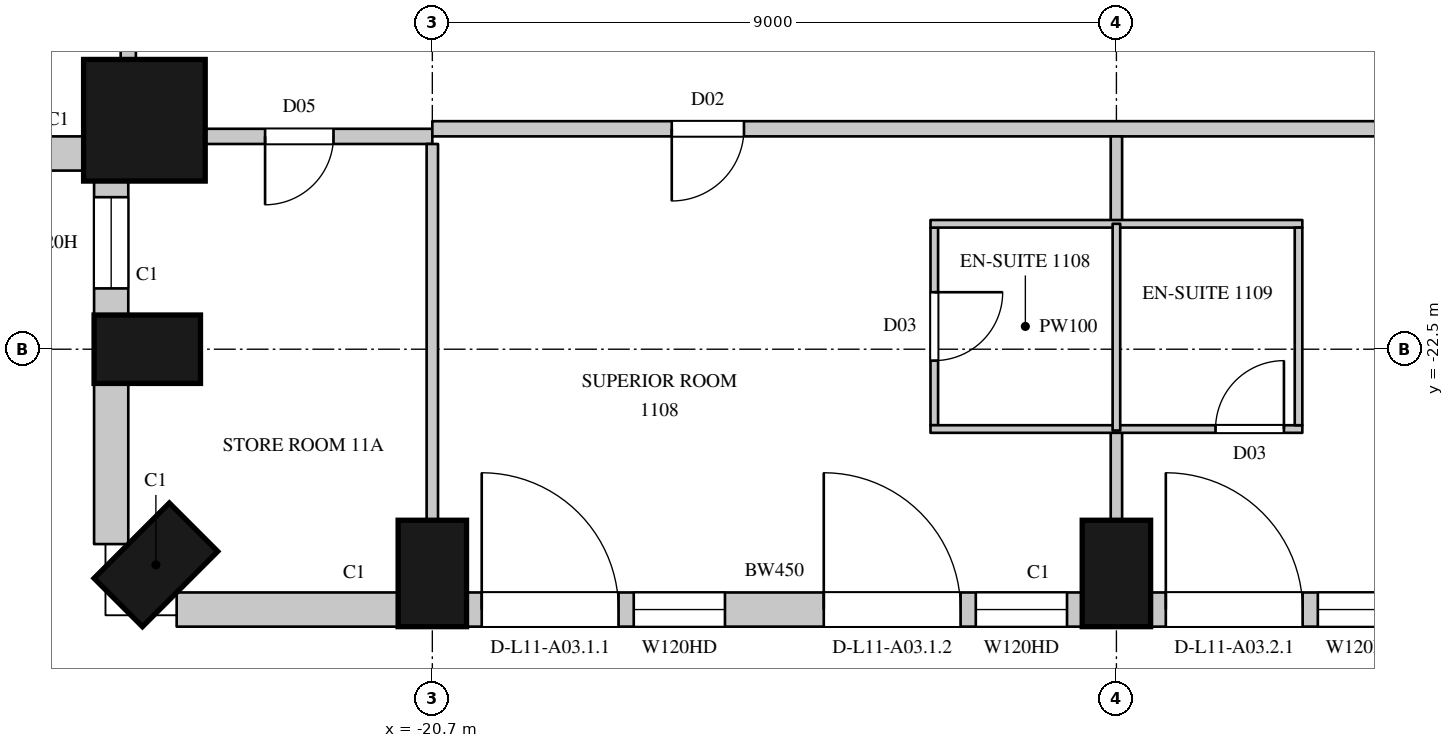
"""IFC4 building model, lengths in metres.
Left out: names, types, materials, properties, quantities, classifications, styles, units other than length and angle.
Written with IfcOpenShell. Run it as: python <this file> out.ifc"""

import sys

from ifc_helpers import new_model, si_unit, direction, frame, frame_2d, origin, origin_2d, place, context, subcontext, project, spatial, rectangle, circle, extrude, element, fill, save


model = new_model("IFC4")
c1 = context("Model", 3, precision=1e-05, world=origin(), true_north=direction((0.0, 1.0)))
c2 = subcontext(c1, "Body", "Model", "MODEL_VIEW")
j1 = project(units=[si_unit("LENGTHUNIT", "METRE"), si_unit("PLANEANGLEUNIT", "RADIAN")], contexts=[c1])
p1 = place(None, origin())
s1 = spatial("IfcSite", under=j1, at=p1, CompositionType="ELEMENT")
p2 = place(p1, origin())
s2 = spatial("IfcBuilding", under=s1, at=p2, CompositionType="ELEMENT")
p3 = place(p2, frame((0.0, 0.0, 69.9)))
s3 = spatial("IfcBuildingStorey", under=s2, at=p3, CompositionType="ELEMENT", Elevation=69.9)
p4 = place(p3, frame((-24.488, -19.488, 0.0), z_axis=(0.0, 0.0, 1.0), x_axis=(1.0, 0.0, 0.0)))
e1 = element("IfcColumn", 1, at=p4, inside=s3, PredefinedType="COLUMN", context=c2, shape_type="SweptSolid", body=[
    extrude(circle(Radius=0.8, at=origin_2d()), origin(), (0.0, 0.0, 1.0), 3.6),
])
for number, where, z_axis, x_axis in (
    (2, (-24.45, -22.5, 0.0), (0.0, 0.0, 1.0), (0.0, -1.0, 0.0)),
    (3, (-24.337, -25.337, 0.0), (0.0, 0.0, 1.0), (0.707, -0.707, 0.0)),
    (4, (-20.7, -25.45, 0.0), (0.0, 0.0, 1.0), (1.0, 0.0, 0.0)),
    (5, (-11.7, -25.45, 0.0), (0.0, 0.0, 1.0), (1.0, 0.0, 0.0)),
):
    element("IfcColumn", number, at=place(p3, frame(where, z_axis=z_axis, x_axis=x_axis)), inside=s3, PredefinedType="COLUMN", context=c2, shape_type="SweptSolid", body=[
        extrude(rectangle(XDim=0.9, YDim=1.4, at=origin_2d()), origin(), (0.0, 0.0, 1.0), 3.6),
    ])
p5 = place(p3, frame((-29.064, -19.925, 0.0), z_axis=(0.0, 0.0, 1.0), x_axis=(1.0, 0.0, 0.0)))
e6 = element("IfcWall", 6, at=p5, inside=s3, PredefinedType="SOLIDWALL", context=c2, shape_type="SweptSolid", body=[
    extrude(rectangle(XDim=3.805, YDim=0.45, at=frame_2d((1.903, 0.0))), origin(), (0.0, 0.0, 1.0), 3.3),
])
p6 = place(p5, frame((0.514, 0.0, 1.05)))
e7 = element("IfcOpeningElement", 7, at=p6, cuts=e6, PredefinedType="OPENING", context=c2, shape_type="SweptSolid", body=[
    extrude(rectangle(XDim=2.7, YDim=2.0, at=frame_2d((1.35, 1.0))), frame((0.0, 0.235, 0.0), z_axis=(0.0, -1.0, 0.0), x_axis=(1.0, 0.0, 0.0)), (0.0, 0.0, 1.0), 0.47),
])
p7 = place(p3, frame((-24.925, -20.259, 0.0), z_axis=(0.0, 0.0, 1.0), x_axis=(0.0, -1.0, 0.0)))
e8 = element("IfcWall", 8, at=p7, inside=s3, PredefinedType="SOLIDWALL", context=c2, shape_type="SweptSolid", body=[
    extrude(rectangle(XDim=1.792, YDim=0.45, at=frame_2d((0.896, 0.0))), origin(), (0.0, 0.0, 1.0), 3.3),
])
p8 = place(p7, frame((0.241, 0.0, 1.05)))
e9 = element("IfcOpeningElement", 9, at=p8, cuts=e8, PredefinedType="OPENING", context=c2, shape_type="SweptSolid", body=[
    extrude(rectangle(XDim=1.2, YDim=2.0, at=frame_2d((0.6, 1.0))), frame((0.0, 0.235, 0.0), z_axis=(0.0, -1.0, 0.0), x_axis=(1.0, 0.0, 0.0)), (0.0, 0.0, 1.0), 0.47),
])
p9 = place(p3, frame((-24.925, -22.95, 0.0), z_axis=(0.0, 0.0, 1.0), x_axis=(0.0, -1.0, 0.0)))
e10 = element("IfcWall", 10, at=p9, inside=s3, PredefinedType="SOLIDWALL", context=c2, shape_type="SweptSolid", body=[
    extrude(rectangle(XDim=2.114, YDim=0.45, at=frame_2d((1.057, 0.0))), origin(), (0.0, 0.0, 1.0), 3.3),
])
p10 = place(p3, frame((-24.064, -25.925, 0.0), z_axis=(0.0, 0.0, 1.0), x_axis=(1.0, 0.0, 0.0)))
e11 = element("IfcWall", 11, at=p10, inside=s3, PredefinedType="SOLIDWALL", context=c2, shape_type="SweptSolid", body=[
    extrude(rectangle(XDim=2.914, YDim=0.45, at=frame_2d((1.457, 0.0))), origin(), (0.0, 0.0, 1.0), 3.3),
])
p11 = place(p3, frame((-20.25, -25.925, 0.0), z_axis=(0.0, 0.0, 1.0), x_axis=(1.0, 0.0, 0.0)))
e12 = element("IfcWall", 12, at=p11, inside=s3, PredefinedType="SOLIDWALL", context=c2, shape_type="SweptSolid", body=[
    extrude(rectangle(XDim=8.1, YDim=0.45, at=frame_2d((4.05, 0.0))), origin(), (0.0, 0.0, 1.0), 3.3),
])
p12 = place(p11, frame((0.2, 0.0, 0.0)))
e13 = element("IfcOpeningElement", 13, at=p12, cuts=e12, PredefinedType="OPENING", context=c2, shape_type="SweptSolid", body=[
    extrude(rectangle(XDim=1.8, YDim=2.4, at=frame_2d((0.9, 1.2))), frame((0.0, 0.235, 0.0), z_axis=(0.0, -1.0, 0.0), x_axis=(1.0, 0.0, 0.0)), (0.0, 0.0, 1.0), 0.47),
])
p13 = place(p11, frame((2.2, 0.0, 1.05)))
e14 = element("IfcOpeningElement", 14, at=p13, cuts=e12, PredefinedType="OPENING", context=c2, shape_type="SweptSolid", body=[
    extrude(rectangle(XDim=1.2, YDim=2.0, at=frame_2d((0.6, 1.0))), frame((0.0, 0.235, 0.0), z_axis=(0.0, -1.0, 0.0), x_axis=(1.0, 0.0, 0.0)), (0.0, 0.0, 1.0), 0.47),
])
p14 = place(p11, frame((4.7, 0.0, 0.0)))
e15 = element("IfcOpeningElement", 15, at=p14, cuts=e12, PredefinedType="OPENING", context=c2, shape_type="SweptSolid", body=[
    extrude(rectangle(XDim=1.8, YDim=2.4, at=frame_2d((0.9, 1.2))), frame((0.0, 0.235, 0.0), z_axis=(0.0, -1.0, 0.0), x_axis=(1.0, 0.0, 0.0)), (0.0, 0.0, 1.0), 0.47),
])
p15 = place(p11, frame((6.7, 0.0, 1.05)))
e16 = element("IfcOpeningElement", 16, at=p15, cuts=e12, PredefinedType="OPENING", context=c2, shape_type="SweptSolid", body=[
    extrude(rectangle(XDim=1.2, YDim=2.0, at=frame_2d((0.6, 1.0))), frame((0.0, 0.235, 0.0), z_axis=(0.0, -1.0, 0.0), x_axis=(1.0, 0.0, 0.0)), (0.0, 0.0, 1.0), 0.47),
])
p16 = place(p3, frame((-11.25, -25.925, 0.0), z_axis=(0.0, 0.0, 1.0), x_axis=(1.0, 0.0, 0.0)))
e17 = element("IfcWall", 17, at=p16, inside=s3, PredefinedType="SOLIDWALL", context=c2, shape_type="SweptSolid", body=[
    extrude(rectangle(XDim=8.1, YDim=0.45, at=frame_2d((4.05, 0.0))), origin(), (0.0, 0.0, 1.0), 3.3),
])
p17 = place(p16, frame((0.2, 0.0, 0.0)))
e18 = element("IfcOpeningElement", 18, at=p17, cuts=e17, PredefinedType="OPENING", context=c2, shape_type="SweptSolid", body=[
    extrude(rectangle(XDim=1.8, YDim=2.4, at=frame_2d((0.9, 1.2))), frame((0.0, 0.235, 0.0), z_axis=(0.0, -1.0, 0.0), x_axis=(1.0, 0.0, 0.0)), (0.0, 0.0, 1.0), 0.47),
])
p18 = place(p16, frame((2.2, 0.0, 1.05)))
e19 = element("IfcOpeningElement", 19, at=p18, cuts=e17, PredefinedType="OPENING", context=c2, shape_type="SweptSolid", body=[
    extrude(rectangle(XDim=1.2, YDim=2.0, at=frame_2d((0.6, 1.0))), frame((0.0, 0.235, 0.0), z_axis=(0.0, -1.0, 0.0), x_axis=(1.0, 0.0, 0.0)), (0.0, 0.0, 1.0), 0.47),
])
p19 = place(p16, frame((4.7, 0.0, 0.0)))
e20 = element("IfcOpeningElement", 20, at=p19, cuts=e17, PredefinedType="OPENING", context=c2, shape_type="SweptSolid", body=[
    extrude(rectangle(XDim=1.8, YDim=2.4, at=frame_2d((0.9, 1.2))), frame((0.0, 0.235, 0.0), z_axis=(0.0, -1.0, 0.0), x_axis=(1.0, 0.0, 0.0)), (0.0, 0.0, 1.0), 0.47),
])
p20 = place(p16, frame((6.7, 0.0, 1.05)))
e21 = element("IfcOpeningElement", 21, at=p20, cuts=e17, PredefinedType="OPENING", context=c2, shape_type="SweptSolid", body=[
    extrude(rectangle(XDim=1.2, YDim=2.0, at=frame_2d((0.6, 1.0))), frame((0.0, 0.235, 0.0), z_axis=(0.0, -1.0, 0.0), x_axis=(1.0, 0.0, 0.0)), (0.0, 0.0, 1.0), 0.47),
])
p21 = place(p3, frame((-24.7, -18.7, 0.0), z_axis=(0.0, 0.0, 1.0), x_axis=(0.0, 1.0, 0.0)))
e22 = element("IfcWall", 22, at=p21, inside=s3, PredefinedType="PARTITIONING", context=c2, shape_type="SweptSolid", body=[
    extrude(rectangle(XDim=2.67, YDim=0.2, at=frame_2d((1.335, 0.0))), origin(), (0.0, 0.0, 1.0), 3.3),
])
p22 = place(p21, frame((0.6, 0.0, 0.0)))
e23 = element("IfcOpeningElement", 23, at=p22, cuts=e22, PredefinedType="OPENING", context=c2, shape_type="SweptSolid", body=[
    extrude(rectangle(XDim=1.6, YDim=2.4, at=frame_2d((0.8, 1.2))), frame((0.0, 0.11, 0.0), z_axis=(0.0, -1.0, 0.0), x_axis=(1.0, 0.0, 0.0)), (0.0, 0.0, 1.0), 0.22),
])
p23 = place(p3, frame((-23.7, -19.7, 0.0), z_axis=(0.0, 0.0, 1.0), x_axis=(1.0, 0.0, 0.0)))
e24 = element("IfcWall", 24, at=p23, inside=s3, PredefinedType="PARTITIONING", context=c2, shape_type="SweptSolid", body=[
    extrude(rectangle(XDim=3.0, YDim=0.2, at=frame_2d((1.5, 0.0))), origin(), (0.0, 0.0, 1.0), 3.3),
])
p24 = place(p23, frame((0.8, 0.0, 0.0)))
e25 = element("IfcOpeningElement", 25, at=p24, cuts=e24, PredefinedType="OPENING", context=c2, shape_type="SweptSolid", body=[
    extrude(rectangle(XDim=0.9, YDim=2.2, at=frame_2d((0.45, 1.1))), frame((0.0, 0.11, 0.0), z_axis=(0.0, -1.0, 0.0), x_axis=(1.0, 0.0, 0.0)), (0.0, 0.0, 1.0), 0.22),
])
p25 = place(p3, frame((-20.7, -19.6, 0.0), z_axis=(0.0, 0.0, 1.0), x_axis=(1.0, 0.0, 0.0)))
e26 = element("IfcWall", 26, at=p25, inside=s3, PredefinedType="PARTITIONING", context=c2, shape_type="SweptSolid", body=[
    extrude(rectangle(XDim=38.825, YDim=0.2, at=frame_2d((19.413, 0.0))), origin(), (0.0, 0.0, 1.0), 3.3),
])
p26 = place(p25, frame((3.15, 0.0, 0.0)))
e27 = element("IfcOpeningElement", 27, at=p26, cuts=e26, PredefinedType="OPENING", context=c2, shape_type="SweptSolid", body=[
    extrude(rectangle(XDim=0.95, YDim=2.2, at=frame_2d((0.475, 1.1))), frame((0.0, 0.11, 0.0), z_axis=(0.0, -1.0, 0.0), x_axis=(1.0, 0.0, 0.0)), (0.0, 0.0, 1.0), 0.22),
])
p27 = place(p25, frame((13.9, 0.0, 0.0)))
e28 = element("IfcOpeningElement", 28, at=p27, cuts=e26, PredefinedType="OPENING", context=c2, shape_type="SweptSolid", body=[
    extrude(rectangle(XDim=0.95, YDim=2.2, at=frame_2d((0.475, 1.1))), frame((0.0, 0.11, 0.0), z_axis=(0.0, -1.0, 0.0), x_axis=(1.0, 0.0, 0.0)), (0.0, 0.0, 1.0), 0.22),
])
p28 = place(p25, frame((21.15, 0.0, 0.0)))
e29 = element("IfcOpeningElement", 29, at=p28, cuts=e26, PredefinedType="OPENING", context=c2, shape_type="SweptSolid", body=[
    extrude(rectangle(XDim=0.95, YDim=2.2, at=frame_2d((0.475, 1.1))), frame((0.0, 0.11, 0.0), z_axis=(0.0, -1.0, 0.0), x_axis=(1.0, 0.0, 0.0)), (0.0, 0.0, 1.0), 0.22),
])
p29 = place(p25, frame((29.75, 0.0, 0.0)))
e30 = element("IfcOpeningElement", 30, at=p29, cuts=e26, PredefinedType="OPENING", context=c2, shape_type="SweptSolid", body=[
    extrude(rectangle(XDim=1.1, YDim=2.4, at=frame_2d((0.55, 1.2))), frame((0.0, 0.11, 0.0), z_axis=(0.0, -1.0, 0.0), x_axis=(1.0, 0.0, 0.0)), (0.0, 0.0, 1.0), 0.22),
])
p30 = place(p3, frame((-20.7, -24.75, 0.0), z_axis=(0.0, 0.0, 1.0), x_axis=(0.0, 1.0, 0.0)))
e31 = element("IfcWall", 31, at=p30, inside=s3, PredefinedType="PARTITIONING", context=c2, shape_type="SweptSolid", body=[
    extrude(rectangle(XDim=4.95, YDim=0.15, at=frame_2d((2.475, 0.0))), origin(), (0.0, 0.0, 1.0), 2.75),
])
p31 = place(p3, frame((-11.7, -24.75, 0.0), z_axis=(0.0, 0.0, 1.0), x_axis=(0.0, 1.0, 0.0)))
e32 = element("IfcWall", 32, at=p31, inside=s3, PredefinedType="PARTITIONING", context=c2, shape_type="SweptSolid", body=[
    extrude(rectangle(XDim=1.18, YDim=0.15, at=frame_2d((0.59, 0.0))), origin(), (0.0, 0.0, 1.0), 2.75),
])
p32 = place(p3, frame((-11.7, -20.85, 0.0), z_axis=(0.0, 0.0, 1.0), x_axis=(0.0, 1.0, 0.0)))
e33 = element("IfcWall", 33, at=p32, inside=s3, PredefinedType="PARTITIONING", context=c2, shape_type="SweptSolid", body=[
    extrude(rectangle(XDim=1.15, YDim=0.15, at=frame_2d((0.575, 0.0))), origin(), (0.0, 0.0, 1.0), 2.75),
])
p33 = place(p3, frame((-14.096, -23.5, 0.0), z_axis=(0.0, 0.0, 1.0), x_axis=(0.0, 1.0, 0.0)))
e34 = element("IfcWall", 34, at=p33, inside=s3, PredefinedType="PARTITIONING", context=c2, shape_type="SweptSolid", body=[
    extrude(rectangle(XDim=2.6, YDim=0.1, at=frame_2d((1.3, 0.0))), origin(), (0.0, 0.0, 1.0), 3.3),
])
p34 = place(p33, frame((0.85, 0.0, 0.0)))
e35 = element("IfcOpeningElement", 35, at=p34, cuts=e34, PredefinedType="OPENING", context=c2, shape_type="SweptSolid", body=[
    extrude(rectangle(XDim=0.9, YDim=2.2, at=frame_2d((0.45, 1.1))), frame((0.0, 0.06, 0.0), z_axis=(0.0, -1.0, 0.0), x_axis=(1.0, 0.0, 0.0)), (0.0, 0.0, 1.0), 0.12),
])
p35 = place(p3, frame((-14.146, -23.55, 0.0), z_axis=(0.0, 0.0, 1.0), x_axis=(1.0, 0.0, 0.0)))
e36 = element("IfcWall", 36, at=p35, inside=s3, PredefinedType="PARTITIONING", context=c2, shape_type="SweptSolid", body=[
    extrude(rectangle(XDim=4.892, YDim=0.1, at=frame_2d((2.446, 0.0))), origin(), (0.0, 0.0, 1.0), 3.3),
])
p36 = place(p35, frame((3.75, 0.0, 0.0)))
e37 = element("IfcOpeningElement", 37, at=p36, cuts=e36, PredefinedType="OPENING", context=c2, shape_type="SweptSolid", body=[
    extrude(rectangle(XDim=0.9, YDim=2.2, at=frame_2d((0.45, 1.1))), frame((0.0, 0.06, 0.0), z_axis=(0.0, -1.0, 0.0), x_axis=(1.0, 0.0, 0.0)), (0.0, 0.0, 1.0), 0.12),
])
p37 = place(p3, frame((-14.146, -20.85, 0.0), z_axis=(0.0, 0.0, 1.0), x_axis=(1.0, 0.0, 0.0)))
e38 = element("IfcWall", 38, at=p37, inside=s3, PredefinedType="PARTITIONING", context=c2, shape_type="SweptSolid", body=[
    extrude(rectangle(XDim=4.892, YDim=0.1, at=frame_2d((2.446, 0.0))), origin(), (0.0, 0.0, 1.0), 3.3),
])
p38 = place(p3, frame((-11.7, -23.57, 0.0), z_axis=(0.0, 0.0, 1.0), x_axis=(0.0, 1.0, 0.0)))
e39 = element("IfcWall", 39, at=p38, inside=s3, PredefinedType="PARTITIONING", context=c2, shape_type="SweptSolid", body=[
    extrude(rectangle(XDim=2.72, YDim=0.1, at=frame_2d((1.36, 0.0))), origin(), (0.0, 0.0, 1.0), 2.75),
])
p39 = place(p3, frame((-9.304, -23.5, 0.0), z_axis=(0.0, 0.0, 1.0), x_axis=(0.0, 1.0, 0.0)))
e40 = element("IfcWall", 40, at=p39, inside=s3, PredefinedType="PARTITIONING", context=c2, shape_type="SweptSolid", body=[
    extrude(rectangle(XDim=2.6, YDim=0.1, at=frame_2d((1.3, 0.0))), origin(), (0.0, 0.0, 1.0), 3.3),
])
p40 = place(p8, origin())
e41 = element("IfcWindow", 41, at=p40, inside=s3, PartitioningType="SINGLE_PANEL", PredefinedType="WINDOW", context=c2, shape_type="SweptSolid", body=[
    extrude(rectangle(XDim=1.2, YDim=2.0, at=frame_2d((0.6, 1.0))), frame((0.0, 0.135, 0.0), z_axis=(0.0, -1.0, 0.0), x_axis=(1.0, 0.0, 0.0)), (0.0, 0.0, 1.0), 0.06),
])
fill(e9, e41)
p41 = place(p12, origin())
e42 = element("IfcDoor", 42, at=p41, inside=s3, OperationType="SLIDING_TO_LEFT", PredefinedType="DOOR", context=c2, shape_type="SweptSolid", body=[
    extrude(rectangle(XDim=1.8, YDim=2.4, at=frame_2d((0.9, 1.2))), frame((0.0, 0.13, 0.0), z_axis=(0.0, -1.0, 0.0), x_axis=(1.0, 0.0, 0.0)), (0.0, 0.0, 1.0), 0.05),
])
fill(e13, e42)
p42 = place(p13, origin())
e43 = element("IfcWindow", 43, at=p42, inside=s3, PartitioningType="SINGLE_PANEL", PredefinedType="WINDOW", context=c2, shape_type="SweptSolid", body=[
    extrude(rectangle(XDim=1.2, YDim=2.0, at=frame_2d((0.6, 1.0))), frame((0.0, 0.135, 0.0), z_axis=(0.0, -1.0, 0.0), x_axis=(1.0, 0.0, 0.0)), (0.0, 0.0, 1.0), 0.06),
])
fill(e14, e43)
p43 = place(p14, origin())
e44 = element("IfcDoor", 44, at=p43, inside=s3, OperationType="SLIDING_TO_LEFT", PredefinedType="DOOR", context=c2, shape_type="SweptSolid", body=[
    extrude(rectangle(XDim=1.8, YDim=2.4, at=frame_2d((0.9, 1.2))), frame((0.0, 0.13, 0.0), z_axis=(0.0, -1.0, 0.0), x_axis=(1.0, 0.0, 0.0)), (0.0, 0.0, 1.0), 0.05),
])
fill(e15, e44)
p44 = place(p15, origin())
e45 = element("IfcWindow", 45, at=p44, inside=s3, PartitioningType="SINGLE_PANEL", PredefinedType="WINDOW", context=c2, shape_type="SweptSolid", body=[
    extrude(rectangle(XDim=1.2, YDim=2.0, at=frame_2d((0.6, 1.0))), frame((0.0, 0.135, 0.0), z_axis=(0.0, -1.0, 0.0), x_axis=(1.0, 0.0, 0.0)), (0.0, 0.0, 1.0), 0.06),
])
fill(e16, e45)
p45 = place(p17, origin())
e46 = element("IfcDoor", 46, at=p45, inside=s3, OperationType="SLIDING_TO_LEFT", PredefinedType="DOOR", context=c2, shape_type="SweptSolid", body=[
    extrude(rectangle(XDim=1.8, YDim=2.4, at=frame_2d((0.9, 1.2))), frame((0.0, 0.13, 0.0), z_axis=(0.0, -1.0, 0.0), x_axis=(1.0, 0.0, 0.0)), (0.0, 0.0, 1.0), 0.05),
])
fill(e18, e46)
p46 = place(p18, origin())
e47 = element("IfcWindow", 47, at=p46, inside=s3, PartitioningType="SINGLE_PANEL", PredefinedType="WINDOW", context=c2, shape_type="SweptSolid", body=[
    extrude(rectangle(XDim=1.2, YDim=2.0, at=frame_2d((0.6, 1.0))), frame((0.0, 0.135, 0.0), z_axis=(0.0, -1.0, 0.0), x_axis=(1.0, 0.0, 0.0)), (0.0, 0.0, 1.0), 0.06),
])
fill(e19, e47)
p47 = place(p24, origin())
e48 = element("IfcDoor", 48, at=p47, inside=s3, OperationType="SINGLE_SWING_RIGHT", PredefinedType="DOOR", context=c2, shape_type="SweptSolid", body=[
    extrude(rectangle(XDim=0.9, YDim=2.2, at=frame_2d((0.45, 1.1))), frame((0.0, 0.025, 0.0), z_axis=(0.0, -1.0, 0.0), x_axis=(1.0, 0.0, 0.0)), (0.0, 0.0, 1.0), 0.05),
])
fill(e25, e48)
p48 = place(p26, origin())
e49 = element("IfcDoor", 49, at=p48, inside=s3, OperationType="SINGLE_SWING_RIGHT", PredefinedType="DOOR", context=c2, shape_type="SweptSolid", body=[
    extrude(rectangle(XDim=0.95, YDim=2.2, at=frame_2d((0.475, 1.1))), frame((0.0, 0.025, 0.0), z_axis=(0.0, -1.0, 0.0), x_axis=(1.0, 0.0, 0.0)), (0.0, 0.0, 1.0), 0.05),
])
fill(e27, e49)
p49 = place(p34, origin())
e50 = element("IfcDoor", 50, at=p49, inside=s3, OperationType="SINGLE_SWING_LEFT", PredefinedType="DOOR", context=c2, shape_type="SweptSolid", body=[
    extrude(rectangle(XDim=0.9, YDim=2.2, at=frame_2d((0.45, 1.1))), frame((0.0, 0.025, 0.0), z_axis=(0.0, -1.0, 0.0), x_axis=(1.0, 0.0, 0.0)), (0.0, 0.0, 1.0), 0.05),
])
fill(e35, e50)
p50 = place(p36, origin())
e51 = element("IfcDoor", 51, at=p50, inside=s3, OperationType="SINGLE_SWING_RIGHT", PredefinedType="DOOR", context=c2, shape_type="SweptSolid", body=[
    extrude(rectangle(XDim=0.9, YDim=2.2, at=frame_2d((0.45, 1.1))), frame((0.0, 0.025, 0.0), z_axis=(0.0, -1.0, 0.0), x_axis=(1.0, 0.0, 0.0)), (0.0, 0.0, 1.0), 0.05),
])
fill(e37, e51)
save(model, sys.argv[1])
